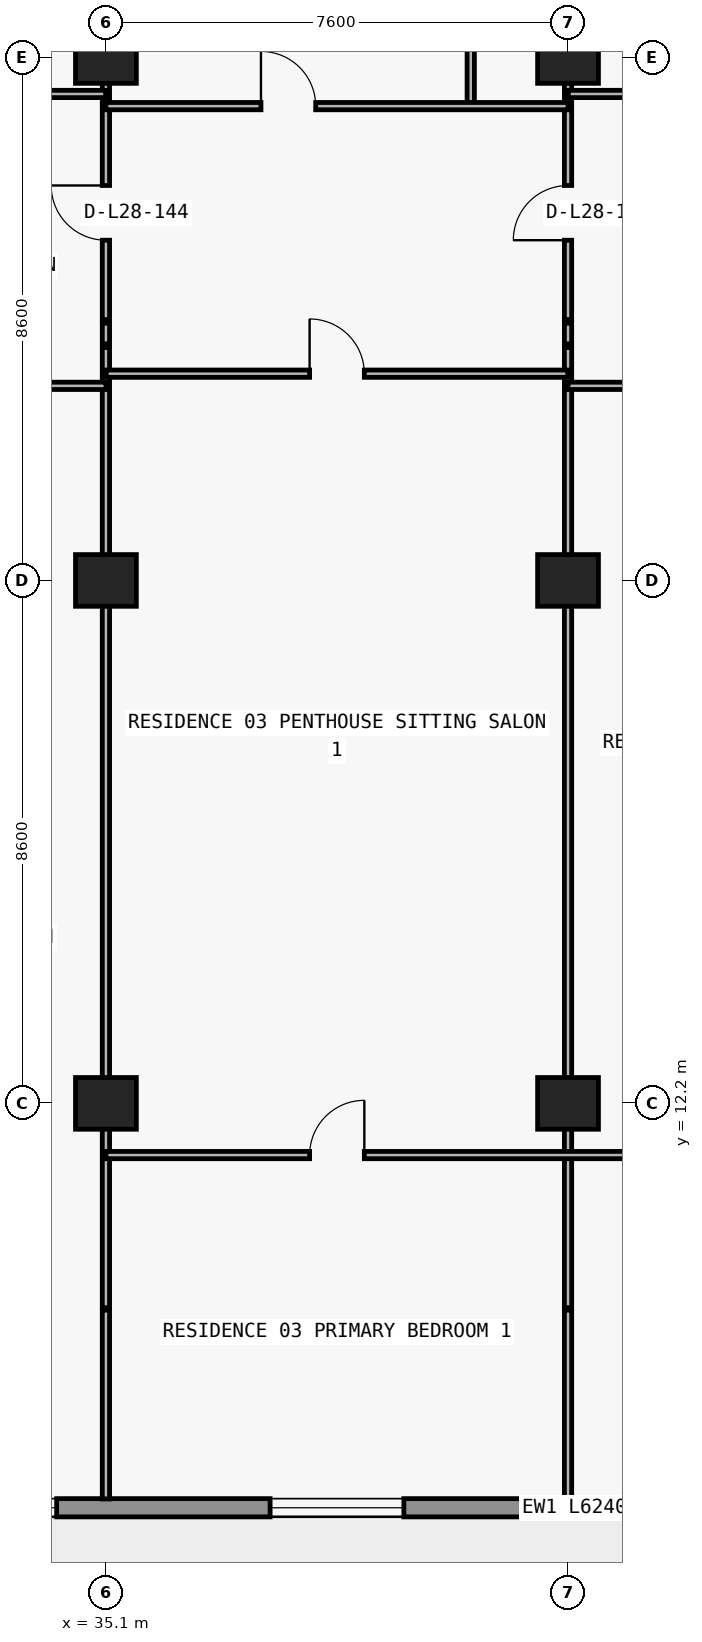
"""IFC4 building model, lengths in metres.
Left out: names, types, materials, properties, quantities, classifications, styles, units other than length and angle.
Written with IfcOpenShell. Run it as: python <this file> out.ifc"""

import sys

from ifc_helpers import new_model, si_unit, direction, frame, frame_2d, origin, origin_2d, place, context, subcontext, project, spatial, rectangle, extrude, element, fill, save


model = new_model("IFC4")
c1 = context("Model", 3, precision=1e-05, world=origin(), true_north=direction((0.0, 1.0)))
c2 = subcontext(c1, "Body", "Model", "MODEL_VIEW")
j1 = project(units=[si_unit("LENGTHUNIT", "METRE"), si_unit("PLANEANGLEUNIT", "RADIAN")], contexts=[c1])
p1 = place(None, origin())
s1 = spatial("IfcSite", under=j1, at=p1, CompositionType="ELEMENT")
p2 = place(p1, origin())
s2 = spatial("IfcBuilding", under=s1, at=p2, CompositionType="ELEMENT")
p3 = place(p2, frame((0.0, 0.0, 105.9)))
s3 = spatial("IfcBuildingStorey", under=s2, at=p3, CompositionType="ELEMENT", Elevation=105.9)
for number, where, z_axis, x_axis in (
    (1, (35.1, 12.2, 0.0), (0.0, 0.0, 1.0), (1.0, 0.0, 0.0)),
    (2, (42.7, 12.2, 0.0), (0.0, 0.0, 1.0), (1.0, 0.0, 0.0)),
    (3, (35.1, 20.8, 0.0), (0.0, 0.0, 1.0), (1.0, 0.0, 0.0)),
    (4, (42.7, 20.8, 0.0), (0.0, 0.0, 1.0), (1.0, 0.0, 0.0)),
    (5, (35.1, 29.4, 0.0), (0.0, 0.0, 1.0), (1.0, 0.0, 0.0)),
    (6, (42.7, 29.4, 0.0), (0.0, 0.0, 1.0), (1.0, 0.0, 0.0)),
):
    element("IfcColumn", number, at=place(p3, frame(where, z_axis=z_axis, x_axis=x_axis)), inside=s3, PredefinedType="COLUMN", context=c2, shape_type="SweptSolid", body=[
        extrude(rectangle(XDim=1.0, YDim=0.85, at=origin_2d()), origin(), (0.0, 0.0, 1.0), 3.05),
    ])
p4 = place(p3, frame((70.1, 5.55, 0.0), z_axis=(0.0, 0.0, 1.0), x_axis=(-1.0, 0.0, 0.0)))
e7 = element("IfcWall", 7, at=p4, inside=s3, PredefinedType="STANDARD", context=c2, shape_type="SweptSolid", body=[
    extrude(rectangle(XDim=62.4, YDim=0.3, at=frame_2d((31.2, 0.0))), origin(), (0.0, 0.0, 1.0), 3.05),
])
p5 = place(p4, frame((57.226, 0.0, 0.0)))
e8 = element("IfcOpeningElement", 8, at=p5, cuts=e7, PredefinedType="OPENING", context=c2, shape_type="SweptSolid", body=[
    extrude(rectangle(XDim=2.0, YDim=2.3, at=frame_2d((1.0, 1.15))), frame((0.0, 0.16, 0.0), z_axis=(0.0, -1.0, 0.0), x_axis=(1.0, 0.0, 0.0)), (0.0, 0.0, 1.0), 0.32),
])
p6 = place(p4, frame((52.926, 0.0, 0.85)))
e9 = element("IfcOpeningElement", 9, at=p6, cuts=e7, PredefinedType="OPENING", context=c2, shape_type="SweptSolid", body=[
    extrude(rectangle(XDim=2.2, YDim=1.55, at=frame_2d((1.1, 0.775))), frame((0.0, 0.16, 0.0), z_axis=(0.0, -1.0, 0.0), x_axis=(1.0, 0.0, 0.0)), (0.0, 0.0, 1.0), 0.32),
])
p7 = place(p4, frame((48.49, 0.0, 0.0)))
e10 = element("IfcOpeningElement", 10, at=p7, cuts=e7, PredefinedType="OPENING", context=c2, shape_type="SweptSolid", body=[
    extrude(rectangle(XDim=2.0, YDim=2.3, at=frame_2d((1.0, 1.15))), frame((0.0, 0.16, 0.0), z_axis=(0.0, -1.0, 0.0), x_axis=(1.0, 0.0, 0.0)), (0.0, 0.0, 1.0), 0.32),
])
p8 = place(p4, frame((44.39, 0.0, 0.85)))
e11 = element("IfcOpeningElement", 11, at=p8, cuts=e7, PredefinedType="OPENING", context=c2, shape_type="SweptSolid", body=[
    extrude(rectangle(XDim=1.8, YDim=1.55, at=frame_2d((0.9, 0.775))), frame((0.0, 0.16, 0.0), z_axis=(0.0, -1.0, 0.0), x_axis=(1.0, 0.0, 0.0)), (0.0, 0.0, 1.0), 0.32),
])
p9 = place(p4, frame((40.49, 0.0, 0.0)))
e12 = element("IfcOpeningElement", 12, at=p9, cuts=e7, PredefinedType="OPENING", context=c2, shape_type="SweptSolid", body=[
    extrude(rectangle(XDim=2.0, YDim=2.3, at=frame_2d((1.0, 1.15))), frame((0.0, 0.16, 0.0), z_axis=(0.0, -1.0, 0.0), x_axis=(1.0, 0.0, 0.0)), (0.0, 0.0, 1.0), 0.32),
])
p10 = place(p4, frame((35.81, 0.0, 0.65)))
e13 = element("IfcOpeningElement", 13, at=p10, cuts=e7, PredefinedType="OPENING", context=c2, shape_type="SweptSolid", body=[
    extrude(rectangle(XDim=2.6, YDim=1.85, at=frame_2d((1.3, 0.925))), frame((0.0, 0.16, 0.0), z_axis=(0.0, -1.0, 0.0), x_axis=(1.0, 0.0, 0.0)), (0.0, 0.0, 1.0), 0.32),
])
p11 = place(p4, frame((30.1, 0.0, 0.85)))
e14 = element("IfcOpeningElement", 14, at=p11, cuts=e7, PredefinedType="OPENING", context=c2, shape_type="SweptSolid", body=[
    extrude(rectangle(XDim=2.2, YDim=1.55, at=frame_2d((1.1, 0.775))), frame((0.0, 0.16, 0.0), z_axis=(0.0, -1.0, 0.0), x_axis=(1.0, 0.0, 0.0)), (0.0, 0.0, 1.0), 0.32),
])
p12 = place(p4, frame((22.1, 0.0, 0.85)))
e15 = element("IfcOpeningElement", 15, at=p12, cuts=e7, PredefinedType="OPENING", context=c2, shape_type="SweptSolid", body=[
    extrude(rectangle(XDim=2.2, YDim=1.55, at=frame_2d((1.1, 0.775))), frame((0.0, 0.16, 0.0), z_axis=(0.0, -1.0, 0.0), x_axis=(1.0, 0.0, 0.0)), (0.0, 0.0, 1.0), 0.32),
])
p13 = place(p4, frame((15.69, 0.0, 0.0)))
e16 = element("IfcOpeningElement", 16, at=p13, cuts=e7, PredefinedType="OPENING", context=c2, shape_type="SweptSolid", body=[
    extrude(rectangle(XDim=2.0, YDim=2.3, at=frame_2d((1.0, 1.15))), frame((0.0, 0.16, 0.0), z_axis=(0.0, -1.0, 0.0), x_axis=(1.0, 0.0, 0.0)), (0.0, 0.0, 1.0), 0.32),
])
p14 = place(p4, frame((11.59, 0.0, 0.85)))
e17 = element("IfcOpeningElement", 17, at=p14, cuts=e7, PredefinedType="OPENING", context=c2, shape_type="SweptSolid", body=[
    extrude(rectangle(XDim=1.8, YDim=1.55, at=frame_2d((0.9, 0.775))), frame((0.0, 0.16, 0.0), z_axis=(0.0, -1.0, 0.0), x_axis=(1.0, 0.0, 0.0)), (0.0, 0.0, 1.0), 0.32),
])
p15 = place(p4, frame((7.626, 0.0, 0.0)))
e18 = element("IfcOpeningElement", 18, at=p15, cuts=e7, PredefinedType="OPENING", context=c2, shape_type="SweptSolid", body=[
    extrude(rectangle(XDim=2.0, YDim=2.3, at=frame_2d((1.0, 1.15))), frame((0.0, 0.16, 0.0), z_axis=(0.0, -1.0, 0.0), x_axis=(1.0, 0.0, 0.0)), (0.0, 0.0, 1.0), 0.32),
])
p16 = place(p4, frame((3.326, 0.0, 0.85)))
e19 = element("IfcOpeningElement", 19, at=p16, cuts=e7, PredefinedType="OPENING", context=c2, shape_type="SweptSolid", body=[
    extrude(rectangle(XDim=2.2, YDim=1.55, at=frame_2d((1.1, 0.775))), frame((0.0, 0.16, 0.0), z_axis=(0.0, -1.0, 0.0), x_axis=(1.0, 0.0, 0.0)), (0.0, 0.0, 1.0), 0.32),
])
p17 = place(p3, frame((35.1, 5.695, 0.0), z_axis=(0.0, 0.0, 1.0), x_axis=(0.0, 1.0, 0.0)))
e20 = element("IfcWall", 20, at=p17, inside=s3, PredefinedType="PARTITIONING", context=c2, shape_type="SweptSolid", body=[
    extrude(rectangle(XDim=3.105, YDim=0.12, at=frame_2d((1.552, 0.0))), origin(), (0.0, 0.0, 1.0), 3.05),
])
p18 = place(p3, frame((35.1, 8.84, 0.0), z_axis=(0.0, 0.0, 1.0), x_axis=(0.0, 1.0, 0.0)))
e21 = element("IfcWall", 21, at=p18, inside=s3, PredefinedType="PARTITIONING", context=c2, shape_type="SweptSolid", body=[
    extrude(rectangle(XDim=15.79, YDim=0.12, at=frame_2d((7.895, 0.0))), origin(), (0.0, 0.0, 1.0), 2.174),
])
p19 = place(p3, frame((35.1, 24.69, 0.0), z_axis=(0.0, 0.0, 1.0), x_axis=(0.0, 1.0, 0.0)))
e22 = element("IfcWall", 22, at=p19, inside=s3, PredefinedType="PARTITIONING", context=c2, shape_type="SweptSolid", body=[
    extrude(rectangle(XDim=0.34, YDim=0.12, at=frame_2d((0.17, 0.0))), origin(), (0.0, 0.0, 1.0), 2.174),
])
p20 = place(p3, frame((35.1, 25.09, 0.0), z_axis=(0.0, 0.0, 1.0), x_axis=(0.0, 1.0, 0.0)))
e23 = element("IfcWall", 23, at=p20, inside=s3, PredefinedType="PARTITIONING", context=c2, shape_type="SweptSolid", body=[
    extrude(rectangle(XDim=4.69, YDim=0.12, at=frame_2d((2.345, 0.0))), origin(), (0.0, 0.0, 1.0), 2.174),
])
p21 = place(p20, frame((1.305, 0.0, 0.0)))
e24 = element("IfcOpeningElement", 24, at=p21, cuts=e23, PredefinedType="OPENING", context=c2, shape_type="SweptSolid", body=[
    extrude(rectangle(XDim=0.9, YDim=2.124, at=frame_2d((0.45, 1.062))), frame((0.0, 0.07, 0.0), z_axis=(0.0, -1.0, 0.0), x_axis=(1.0, 0.0, 0.0)), (0.0, 0.0, 1.0), 0.14),
])
p22 = place(p3, frame((41.1, 28.6, 0.0), z_axis=(0.0, 0.0, 1.0), x_axis=(0.0, 1.0, 0.0)))
e25 = element("IfcWall", 25, at=p22, inside=s3, PredefinedType="PARTITIONING", context=c2, shape_type="SweptSolid", body=[
    extrude(rectangle(XDim=1.18, YDim=0.12, at=frame_2d((0.59, 0.0))), origin(), (0.0, 0.0, 1.0), 3.05),
])
p23 = place(p3, frame((42.7, 5.695, 0.0), z_axis=(0.0, 0.0, 1.0), x_axis=(0.0, 1.0, 0.0)))
e26 = element("IfcWall", 26, at=p23, inside=s3, PredefinedType="PARTITIONING", context=c2, shape_type="SweptSolid", body=[
    extrude(rectangle(XDim=3.105, YDim=0.12, at=frame_2d((1.552, 0.0))), origin(), (0.0, 0.0, 1.0), 3.05),
])
p24 = place(p3, frame((42.7, 8.84, 0.0), z_axis=(0.0, 0.0, 1.0), x_axis=(0.0, 1.0, 0.0)))
e27 = element("IfcWall", 27, at=p24, inside=s3, PredefinedType="PARTITIONING", context=c2, shape_type="SweptSolid", body=[
    extrude(rectangle(XDim=15.79, YDim=0.12, at=frame_2d((7.895, 0.0))), origin(), (0.0, 0.0, 1.0), 2.174),
])
p25 = place(p3, frame((42.7, 24.69, 0.0), z_axis=(0.0, 0.0, 1.0), x_axis=(0.0, 1.0, 0.0)))
e28 = element("IfcWall", 28, at=p25, inside=s3, PredefinedType="PARTITIONING", context=c2, shape_type="SweptSolid", body=[
    extrude(rectangle(XDim=0.34, YDim=0.12, at=frame_2d((0.17, 0.0))), origin(), (0.0, 0.0, 1.0), 2.174),
])
p26 = place(p3, frame((42.7, 25.09, 0.0), z_axis=(0.0, 0.0, 1.0), x_axis=(0.0, 1.0, 0.0)))
e29 = element("IfcWall", 29, at=p26, inside=s3, PredefinedType="PARTITIONING", context=c2, shape_type="SweptSolid", body=[
    extrude(rectangle(XDim=4.69, YDim=0.12, at=frame_2d((2.345, 0.0))), origin(), (0.0, 0.0, 1.0), 2.174),
])
p27 = place(p26, frame((1.305, 0.0, 0.0)))
e30 = element("IfcOpeningElement", 30, at=p27, cuts=e29, PredefinedType="OPENING", context=c2, shape_type="SweptSolid", body=[
    extrude(rectangle(XDim=0.9, YDim=2.124, at=frame_2d((0.45, 1.062))), frame((0.0, 0.07, 0.0), z_axis=(0.0, -1.0, 0.0), x_axis=(1.0, 0.0, 0.0)), (0.0, 0.0, 1.0), 0.14),
])
p28 = place(p3, frame((35.1, 11.35, 0.0), z_axis=(0.0, 0.0, 1.0), x_axis=(1.0, 0.0, 0.0)))
e31 = element("IfcWall", 31, at=p28, inside=s3, PredefinedType="PARTITIONING", context=c2, shape_type="SweptSolid", body=[
    extrude(rectangle(XDim=16.0, YDim=0.12, at=frame_2d((8.0, 0.0))), origin(), (0.0, 0.0, 1.0), 3.05),
])
p29 = place(p28, frame((3.35, 0.0, 0.0)))
e32 = element("IfcOpeningElement", 32, at=p29, cuts=e31, PredefinedType="OPENING", context=c2, shape_type="SweptSolid", body=[
    extrude(rectangle(XDim=0.9, YDim=2.15, at=frame_2d((0.45, 1.075))), frame((0.0, 0.07, 0.0), z_axis=(0.0, -1.0, 0.0), x_axis=(1.0, 0.0, 0.0)), (0.0, 0.0, 1.0), 0.14),
])
p30 = place(p28, frame((11.35, 0.0, 0.0)))
e33 = element("IfcOpeningElement", 33, at=p30, cuts=e31, PredefinedType="OPENING", context=c2, shape_type="SweptSolid", body=[
    extrude(rectangle(XDim=0.9, YDim=2.15, at=frame_2d((0.45, 1.075))), frame((0.0, 0.07, 0.0), z_axis=(0.0, -1.0, 0.0), x_axis=(1.0, 0.0, 0.0)), (0.0, 0.0, 1.0), 0.14),
])
p31 = place(p3, frame((26.92, 24.0, 0.0), z_axis=(0.0, 0.0, 1.0), x_axis=(1.0, 0.0, 0.0)))
e34 = element("IfcWall", 34, at=p31, inside=s3, PredefinedType="PARTITIONING", context=c2, shape_type="SweptSolid", body=[
    extrude(rectangle(XDim=8.18, YDim=0.12, at=frame_2d((4.09, 0.0))), origin(), (0.0, 0.0, 1.0), 3.05),
])
p32 = place(p31, frame((1.33, 0.0, 0.0)))
e35 = element("IfcOpeningElement", 35, at=p32, cuts=e34, PredefinedType="OPENING", context=c2, shape_type="SweptSolid", body=[
    extrude(rectangle(XDim=0.9, YDim=2.15, at=frame_2d((0.45, 1.075))), frame((0.0, 0.07, 0.0), z_axis=(0.0, -1.0, 0.0), x_axis=(1.0, 0.0, 0.0)), (0.0, 0.0, 1.0), 0.14),
])
p33 = place(p3, frame((42.7, 24.0, 0.0), z_axis=(0.0, 0.0, 1.0), x_axis=(1.0, 0.0, 0.0)))
e36 = element("IfcWall", 36, at=p33, inside=s3, PredefinedType="PARTITIONING", context=c2, shape_type="SweptSolid", body=[
    extrude(rectangle(XDim=8.18, YDim=0.12, at=frame_2d((4.09, 0.0))), origin(), (0.0, 0.0, 1.0), 3.05),
])
p34 = place(p33, frame((3.64, 0.0, 0.0)))
e37 = element("IfcOpeningElement", 37, at=p34, cuts=e36, PredefinedType="OPENING", context=c2, shape_type="SweptSolid", body=[
    extrude(rectangle(XDim=0.9, YDim=2.15, at=frame_2d((0.45, 1.075))), frame((0.0, 0.07, 0.0), z_axis=(0.0, -1.0, 0.0), x_axis=(1.0, 0.0, 0.0)), (0.0, 0.0, 1.0), 0.14),
])
p35 = place(p3, frame((35.105, 24.2, 0.0), z_axis=(0.0, 0.0, 1.0), x_axis=(1.0, 0.0, 0.0)))
e38 = element("IfcWall", 38, at=p35, inside=s3, PredefinedType="PARTITIONING", context=c2, shape_type="SweptSolid", body=[
    extrude(rectangle(XDim=7.59, YDim=0.12, at=frame_2d((3.795, 0.0))), origin(), (0.0, 0.0, 1.0), 3.05),
])
p36 = place(p35, frame((3.345, 0.0, 0.0)))
e39 = element("IfcOpeningElement", 39, at=p36, cuts=e38, PredefinedType="OPENING", context=c2, shape_type="SweptSolid", body=[
    extrude(rectangle(XDim=0.9, YDim=2.15, at=frame_2d((0.45, 1.075))), frame((0.0, 0.07, 0.0), z_axis=(0.0, -1.0, 0.0), x_axis=(1.0, 0.0, 0.0)), (0.0, 0.0, 1.0), 0.14),
])
p37 = place(p3, frame((35.1, 28.6, 0.0), z_axis=(0.0, 0.0, 1.0), x_axis=(1.0, 0.0, 0.0)))
e40 = element("IfcWall", 40, at=p37, inside=s3, PredefinedType="PARTITIONING", context=c2, shape_type="SweptSolid", body=[
    extrude(rectangle(XDim=7.6, YDim=0.12, at=frame_2d((3.8, 0.0))), origin(), (0.0, 0.0, 1.0), 3.05),
])
p38 = place(p37, frame((2.55, 0.0, 0.0)))
e41 = element("IfcOpeningElement", 41, at=p38, cuts=e40, PredefinedType="OPENING", context=c2, shape_type="SweptSolid", body=[
    extrude(rectangle(XDim=0.9, YDim=2.15, at=frame_2d((0.45, 1.075))), frame((0.0, 0.07, 0.0), z_axis=(0.0, -1.0, 0.0), x_axis=(1.0, 0.0, 0.0)), (0.0, 0.0, 1.0), 0.14),
])
p39 = place(p3, frame((26.92, 28.8, 0.0), z_axis=(0.0, 0.0, 1.0), x_axis=(1.0, 0.0, 0.0)))
e42 = element("IfcWall", 42, at=p39, inside=s3, PredefinedType="PARTITIONING", context=c2, shape_type="SweptSolid", body=[
    extrude(rectangle(XDim=8.175, YDim=0.12, at=frame_2d((4.087, 0.0))), origin(), (0.0, 0.0, 1.0), 3.05),
])
p40 = place(p39, frame((1.33, 0.0, 0.0)))
e43 = element("IfcOpeningElement", 43, at=p40, cuts=e42, PredefinedType="OPENING", context=c2, shape_type="SweptSolid", body=[
    extrude(rectangle(XDim=0.9, YDim=2.15, at=frame_2d((0.45, 1.075))), frame((0.0, 0.07, 0.0), z_axis=(0.0, -1.0, 0.0), x_axis=(1.0, 0.0, 0.0)), (0.0, 0.0, 1.0), 0.14),
])
p41 = place(p3, frame((42.705, 28.8, 0.0), z_axis=(0.0, 0.0, 1.0), x_axis=(1.0, 0.0, 0.0)))
e44 = element("IfcWall", 44, at=p41, inside=s3, PredefinedType="PARTITIONING", context=c2, shape_type="SweptSolid", body=[
    extrude(rectangle(XDim=8.175, YDim=0.12, at=frame_2d((4.087, 0.0))), origin(), (0.0, 0.0, 1.0), 3.05),
])
p42 = place(p41, frame((2.877, 0.0, 0.0)))
e45 = element("IfcOpeningElement", 45, at=p42, cuts=e44, PredefinedType="OPENING", context=c2, shape_type="SweptSolid", body=[
    extrude(rectangle(XDim=0.9, YDim=2.15, at=frame_2d((0.45, 1.075))), frame((0.0, 0.07, 0.0), z_axis=(0.0, -1.0, 0.0), x_axis=(1.0, 0.0, 0.0)), (0.0, 0.0, 1.0), 0.14),
])
p43 = place(p10, origin())
e46 = element("IfcWindow", 46, at=p43, inside=s3, PartitioningType="SINGLE_PANEL", PredefinedType="WINDOW", context=c2, shape_type="SweptSolid", body=[
    extrude(rectangle(XDim=2.6, YDim=1.85, at=frame_2d((1.3, 0.925))), frame((0.0, 0.03, 0.0), z_axis=(0.0, -1.0, 0.0), x_axis=(1.0, 0.0, 0.0)), (0.0, 0.0, 1.0), 0.06),
])
fill(e13, e46)
p44 = place(p11, origin())
e47 = element("IfcWindow", 47, at=p44, inside=s3, PartitioningType="SINGLE_PANEL", PredefinedType="WINDOW", context=c2, shape_type="SweptSolid", body=[
    extrude(rectangle(XDim=2.2, YDim=1.55, at=frame_2d((1.1, 0.775))), frame((0.0, 0.03, 0.0), z_axis=(0.0, -1.0, 0.0), x_axis=(1.0, 0.0, 0.0)), (0.0, 0.0, 1.0), 0.06),
])
fill(e14, e47)
p45 = place(p21, origin())
e48 = element("IfcDoor", 48, at=p45, inside=s3, OperationType="SINGLE_SWING_RIGHT", PredefinedType="DOOR", context=c2, shape_type="SweptSolid", body=[
    extrude(rectangle(XDim=0.9, YDim=2.124, at=frame_2d((0.45, 1.062))), frame((0.0, 0.025, 0.0), z_axis=(0.0, -1.0, 0.0), x_axis=(1.0, 0.0, 0.0)), (0.0, 0.0, 1.0), 0.05),
])
fill(e24, e48)
p46 = place(p38, origin())
e49 = element("IfcDoor", 49, at=p46, inside=s3, OperationType="SINGLE_SWING_LEFT", PredefinedType="DOOR", context=c2, shape_type="SweptSolid", body=[
    extrude(rectangle(XDim=0.9, YDim=2.15, at=frame_2d((0.45, 1.075))), frame((0.0, 0.025, 0.0), z_axis=(0.0, -1.0, 0.0), x_axis=(1.0, 0.0, 0.0)), (0.0, 0.0, 1.0), 0.05),
])
fill(e41, e49)
p47 = place(p36, origin())
e50 = element("IfcDoor", 50, at=p47, inside=s3, OperationType="SINGLE_SWING_LEFT", PredefinedType="DOOR", context=c2, shape_type="SweptSolid", body=[
    extrude(rectangle(XDim=0.9, YDim=2.15, at=frame_2d((0.45, 1.075))), frame((0.0, 0.025, 0.0), z_axis=(0.0, -1.0, 0.0), x_axis=(1.0, 0.0, 0.0)), (0.0, 0.0, 1.0), 0.05),
])
fill(e39, e50)
p48 = place(p29, origin())
e51 = element("IfcDoor", 51, at=p48, inside=s3, OperationType="SINGLE_SWING_RIGHT", PredefinedType="DOOR", context=c2, shape_type="SweptSolid", body=[
    extrude(rectangle(XDim=0.9, YDim=2.15, at=frame_2d((0.45, 1.075))), frame((0.0, 0.025, 0.0), z_axis=(0.0, -1.0, 0.0), x_axis=(1.0, 0.0, 0.0)), (0.0, 0.0, 1.0), 0.05),
])
fill(e32, e51)
p49 = place(p27, origin())
e52 = element("IfcDoor", 52, at=p49, inside=s3, OperationType="SINGLE_SWING_LEFT", PredefinedType="DOOR", context=c2, shape_type="SweptSolid", body=[
    extrude(rectangle(XDim=0.9, YDim=2.124, at=frame_2d((0.45, 1.062))), frame((0.0, 0.025, 0.0), z_axis=(0.0, -1.0, 0.0), x_axis=(1.0, 0.0, 0.0)), (0.0, 0.0, 1.0), 0.05),
])
fill(e30, e52)
save(model, sys.argv[1])
